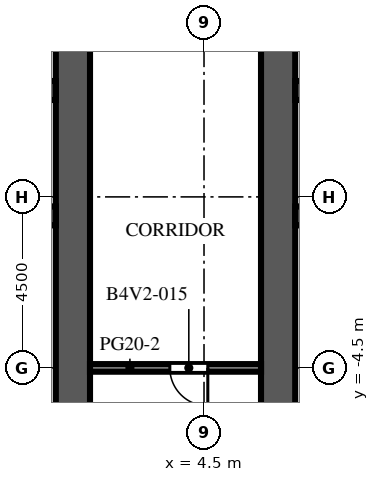
"""IFC4 building model, lengths in metres.
Left out: names, types, materials, properties, quantities, classifications, styles, units other than length and angle.
Written with IfcOpenShell. Run it as: python <this file> out.ifc"""

import sys

from ifc_helpers import new_model, si_unit, direction, frame, frame_2d, origin, place, context, subcontext, project, spatial, rectangle, extrude, element, fill, save


model = new_model("IFC4")
c1 = context("Model", 3, precision=1e-05, world=origin(), true_north=direction((0.0, 1.0)))
c2 = subcontext(c1, "Body", "Model", "MODEL_VIEW")
j1 = project(units=[si_unit("LENGTHUNIT", "METRE"), si_unit("PLANEANGLEUNIT", "RADIAN")], contexts=[c1])
p1 = place(None, origin())
s1 = spatial("IfcSite", under=j1, at=p1, CompositionType="ELEMENT")
p2 = place(p1, origin())
s2 = spatial("IfcBuilding", under=s1, at=p2, CompositionType="ELEMENT")
p3 = place(p2, frame((0.0, 0.0, 141.3)))
s3 = spatial("IfcBuildingStorey", under=s2, at=p3, CompositionType="ELEMENT", Elevation=141.3)
p4 = place(p3, frame((1.05, -9.0, 0.0), z_axis=(0.0, 0.0, 1.0), x_axis=(0.0, 1.0, 0.0)))
e1 = element("IfcWall", 1, at=p4, inside=s3, PredefinedType="SHEAR", context=c2, shape_type="SweptSolid", body=[
    extrude(rectangle(XDim=27.5, YDim=0.9, at=frame_2d((13.75, 0.0))), origin(), (0.0, 0.0, 1.0), 4.1),
])
p5 = place(p4, frame((12.55, 0.0, 0.0)))
e2 = element("IfcOpeningElement", 2, at=p5, cuts=e1, PredefinedType="OPENING", context=c2, shape_type="SweptSolid", body=[
    extrude(rectangle(XDim=2.4, YDim=2.4, at=frame_2d((1.2, 1.2))), frame((0.0, 0.46, 0.0), z_axis=(0.0, -1.0, 0.0), x_axis=(1.0, 0.0, 0.0)), (0.0, 0.0, 1.0), 0.92),
])
p6 = place(p4, frame((5.51, 0.0, 0.0)))
e3 = element("IfcOpeningElement", 3, at=p6, cuts=e1, PredefinedType="OPENING", context=c2, shape_type="SweptSolid", body=[
    extrude(rectangle(XDim=0.923, YDim=2.1, at=frame_2d((0.461, 1.05))), frame((0.0, 0.46, 0.0), z_axis=(0.0, -1.0, 0.0), x_axis=(1.0, 0.0, 0.0)), (0.0, 0.0, 1.0), 0.92),
])
p7 = place(p4, frame((23.427, 0.0, 0.0)))
e4 = element("IfcOpeningElement", 4, at=p7, cuts=e1, PredefinedType="OPENING", context=c2, shape_type="SweptSolid", body=[
    extrude(rectangle(XDim=1.2, YDim=2.1, at=frame_2d((0.6, 1.05))), frame((0.0, 0.46, 0.0), z_axis=(0.0, -1.0, 0.0), x_axis=(1.0, 0.0, 0.0)), (0.0, 0.0, 1.0), 0.92),
])
p8 = place(p3, frame((-9.6, -0.5, 0.0), z_axis=(0.0, 0.0, 1.0), x_axis=(1.0, 0.0, 0.0)))
e5 = element("IfcWall", 5, at=p8, inside=s3, PredefinedType="SHEAR", context=c2, shape_type="SweptSolid", body=[
    extrude(rectangle(XDim=10.2, YDim=0.5, at=frame_2d((5.1, 0.0))), origin(), (0.0, 0.0, 1.0), 4.1),
])
p9 = place(p3, frame((-9.6, 2.8, 0.0), z_axis=(0.0, 0.0, 1.0), x_axis=(1.0, 0.0, 0.0)))
e6 = element("IfcWall", 6, at=p9, inside=s3, PredefinedType="SHEAR", context=c2, shape_type="SweptSolid", body=[
    extrude(rectangle(XDim=10.2, YDim=0.5, at=frame_2d((5.1, 0.0))), origin(), (0.0, 0.0, 1.0), 4.1),
])
p10 = place(p9, frame((0.562, 0.0, 0.0)))
e7 = element("IfcOpeningElement", 7, at=p10, cuts=e6, PredefinedType="OPENING", context=c2, shape_type="SweptSolid", body=[
    extrude(rectangle(XDim=1.1, YDim=2.1, at=frame_2d((0.55, 1.05))), frame((0.0, 0.26, 0.0), z_axis=(0.0, -1.0, 0.0), x_axis=(1.0, 0.0, 0.0)), (0.0, 0.0, 1.0), 0.52),
])
p11 = place(p9, frame((3.238, 0.0, 0.0)))
e8 = element("IfcOpeningElement", 8, at=p11, cuts=e6, PredefinedType="OPENING", context=c2, shape_type="SweptSolid", body=[
    extrude(rectangle(XDim=1.1, YDim=2.1, at=frame_2d((0.55, 1.05))), frame((0.0, 0.26, 0.0), z_axis=(0.0, -1.0, 0.0), x_axis=(1.0, 0.0, 0.0)), (0.0, 0.0, 1.0), 0.52),
])
p12 = place(p9, frame((8.538, 0.0, 0.0)))
e9 = element("IfcOpeningElement", 9, at=p12, cuts=e6, PredefinedType="OPENING", context=c2, shape_type="SweptSolid", body=[
    extrude(rectangle(XDim=1.1, YDim=2.1, at=frame_2d((0.55, 1.05))), frame((0.0, 0.26, 0.0), z_axis=(0.0, -1.0, 0.0), x_axis=(1.0, 0.0, 0.0)), (0.0, 0.0, 1.0), 0.52),
])
p13 = place(p3, frame((6.45, -9.0, 0.0), z_axis=(0.0, 0.0, 1.0), x_axis=(0.0, 1.0, 0.0)))
e10 = element("IfcWall", 10, at=p13, inside=s3, PredefinedType="SHEAR", context=c2, shape_type="SweptSolid", body=[
    extrude(rectangle(XDim=27.5, YDim=0.9, at=frame_2d((13.75, 0.0))), origin(), (0.0, 0.0, 1.0), 4.1),
])
p14 = place(p13, frame((12.55, 0.0, 0.0)))
e11 = element("IfcOpeningElement", 11, at=p14, cuts=e10, PredefinedType="OPENING", context=c2, shape_type="SweptSolid", body=[
    extrude(rectangle(XDim=2.4, YDim=2.4, at=frame_2d((1.2, 1.2))), frame((0.0, 0.46, 0.0), z_axis=(0.0, -1.0, 0.0), x_axis=(1.0, 0.0, 0.0)), (0.0, 0.0, 1.0), 0.92),
])
p15 = place(p13, frame((5.51, 0.0, 0.0)))
e12 = element("IfcOpeningElement", 12, at=p15, cuts=e10, PredefinedType="OPENING", context=c2, shape_type="SweptSolid", body=[
    extrude(rectangle(XDim=0.923, YDim=2.1, at=frame_2d((0.461, 1.05))), frame((0.0, 0.46, 0.0), z_axis=(0.0, -1.0, 0.0), x_axis=(1.0, 0.0, 0.0)), (0.0, 0.0, 1.0), 0.92),
])
p16 = place(p13, frame((23.427, 0.0, 0.0)))
e13 = element("IfcOpeningElement", 13, at=p16, cuts=e10, PredefinedType="OPENING", context=c2, shape_type="SweptSolid", body=[
    extrude(rectangle(XDim=1.2, YDim=2.1, at=frame_2d((0.6, 1.05))), frame((0.0, 0.46, 0.0), z_axis=(0.0, -1.0, 0.0), x_axis=(1.0, 0.0, 0.0)), (0.0, 0.0, 1.0), 0.92),
])
p17 = place(p3, frame((6.9, -0.5, 0.0), z_axis=(0.0, 0.0, 1.0), x_axis=(1.0, 0.0, 0.0)))
e14 = element("IfcWall", 14, at=p17, inside=s3, PredefinedType="SHEAR", context=c2, shape_type="SweptSolid", body=[
    extrude(rectangle(XDim=10.2, YDim=0.5, at=frame_2d((5.1, 0.0))), origin(), (0.0, 0.0, 1.0), 4.1),
])
p18 = place(p3, frame((6.9, 2.8, 0.0), z_axis=(0.0, 0.0, 1.0), x_axis=(1.0, 0.0, 0.0)))
e15 = element("IfcWall", 15, at=p18, inside=s3, PredefinedType="SHEAR", context=c2, shape_type="SweptSolid", body=[
    extrude(rectangle(XDim=10.2, YDim=0.5, at=frame_2d((5.1, 0.0))), origin(), (0.0, 0.0, 1.0), 4.1),
])
p19 = place(p18, frame((0.562, 0.0, 0.0)))
e16 = element("IfcOpeningElement", 16, at=p19, cuts=e15, PredefinedType="OPENING", context=c2, shape_type="SweptSolid", body=[
    extrude(rectangle(XDim=1.1, YDim=2.1, at=frame_2d((0.55, 1.05))), frame((0.0, 0.26, 0.0), z_axis=(0.0, -1.0, 0.0), x_axis=(1.0, 0.0, 0.0)), (0.0, 0.0, 1.0), 0.52),
])
p20 = place(p18, frame((3.238, 0.0, 0.0)))
e17 = element("IfcOpeningElement", 17, at=p20, cuts=e15, PredefinedType="OPENING", context=c2, shape_type="SweptSolid", body=[
    extrude(rectangle(XDim=1.1, YDim=2.1, at=frame_2d((0.55, 1.05))), frame((0.0, 0.26, 0.0), z_axis=(0.0, -1.0, 0.0), x_axis=(1.0, 0.0, 0.0)), (0.0, 0.0, 1.0), 0.52),
])
p21 = place(p18, frame((8.538, 0.0, 0.0)))
e18 = element("IfcOpeningElement", 18, at=p21, cuts=e15, PredefinedType="OPENING", context=c2, shape_type="SweptSolid", body=[
    extrude(rectangle(XDim=1.1, YDim=2.1, at=frame_2d((0.55, 1.05))), frame((0.0, 0.26, 0.0), z_axis=(0.0, -1.0, 0.0), x_axis=(1.0, 0.0, 0.0)), (0.0, 0.0, 1.0), 0.52),
])
p22 = place(p3, frame((-1.825, -3.69, 0.0), z_axis=(0.0, 0.0, 1.0), x_axis=(1.0, 0.0, 0.0)))
e19 = element("IfcWall", 19, at=p22, inside=s3, PredefinedType="PARTITIONING", context=c2, shape_type="SweptSolid", body=[
    extrude(rectangle(XDim=2.425, YDim=0.1, at=frame_2d((1.212, 0.0))), origin(), (0.0, 0.0, 1.0), 3.5),
])
p23 = place(p22, frame((0.712, 0.0, 0.0)))
e20 = element("IfcOpeningElement", 20, at=p23, cuts=e19, PredefinedType="OPENING", context=c2, shape_type="SweptSolid", body=[
    extrude(rectangle(XDim=1.0, YDim=2.1, at=frame_2d((0.5, 1.05))), frame((0.0, 0.06, 0.0), z_axis=(0.0, -1.0, 0.0), x_axis=(1.0, 0.0, 0.0)), (0.0, 0.0, 1.0), 0.12),
])
p24 = place(p3, frame((-1.825, -2.367, 0.0), z_axis=(0.0, 0.0, 1.0), x_axis=(1.0, 0.0, 0.0)))
e21 = element("IfcWall", 21, at=p24, inside=s3, PredefinedType="PARTITIONING", context=c2, shape_type="SweptSolid", body=[
    extrude(rectangle(XDim=2.425, YDim=0.1, at=frame_2d((1.212, 0.0))), origin(), (0.0, 0.0, 1.0), 3.5),
])
p25 = place(p24, frame((0.712, 0.0, 0.0)))
e22 = element("IfcOpeningElement", 22, at=p25, cuts=e21, PredefinedType="OPENING", context=c2, shape_type="SweptSolid", body=[
    extrude(rectangle(XDim=1.0, YDim=2.1, at=frame_2d((0.5, 1.05))), frame((0.0, 0.06, 0.0), z_axis=(0.0, -1.0, 0.0), x_axis=(1.0, 0.0, 0.0)), (0.0, 0.0, 1.0), 0.12),
])
p26 = place(p3, frame((6.9, -3.69, 0.0), z_axis=(0.0, 0.0, 1.0), x_axis=(1.0, 0.0, 0.0)))
e23 = element("IfcWall", 23, at=p26, inside=s3, PredefinedType="PARTITIONING", context=c2, shape_type="SweptSolid", body=[
    extrude(rectangle(XDim=2.425, YDim=0.1, at=frame_2d((1.212, 0.0))), origin(), (0.0, 0.0, 1.0), 3.5),
])
p27 = place(p26, frame((0.712, 0.0, 0.0)))
e24 = element("IfcOpeningElement", 24, at=p27, cuts=e23, PredefinedType="OPENING", context=c2, shape_type="SweptSolid", body=[
    extrude(rectangle(XDim=1.0, YDim=2.1, at=frame_2d((0.5, 1.05))), frame((0.0, 0.06, 0.0), z_axis=(0.0, -1.0, 0.0), x_axis=(1.0, 0.0, 0.0)), (0.0, 0.0, 1.0), 0.12),
])
p28 = place(p3, frame((6.9, -2.367, 0.0), z_axis=(0.0, 0.0, 1.0), x_axis=(1.0, 0.0, 0.0)))
e25 = element("IfcWall", 25, at=p28, inside=s3, PredefinedType="PARTITIONING", context=c2, shape_type="SweptSolid", body=[
    extrude(rectangle(XDim=2.425, YDim=0.1, at=frame_2d((1.212, 0.0))), origin(), (0.0, 0.0, 1.0), 3.5),
])
p29 = place(p28, frame((0.712, 0.0, 0.0)))
e26 = element("IfcOpeningElement", 26, at=p29, cuts=e25, PredefinedType="OPENING", context=c2, shape_type="SweptSolid", body=[
    extrude(rectangle(XDim=1.0, YDim=2.1, at=frame_2d((0.5, 1.05))), frame((0.0, 0.06, 0.0), z_axis=(0.0, -1.0, 0.0), x_axis=(1.0, 0.0, 0.0)), (0.0, 0.0, 1.0), 0.12),
])
p30 = place(p3, frame((6.0, -4.5, 0.0), z_axis=(0.0, 0.0, 1.0), x_axis=(-1.0, 0.0, 0.0)))
e27 = element("IfcWall", 27, at=p30, inside=s3, PredefinedType="PARTITIONING", context=c2, shape_type="SweptSolid", body=[
    extrude(rectangle(XDim=4.5, YDim=0.2, at=frame_2d((2.25, 0.0))), origin(), (0.0, 0.0, 1.0), 3.5),
])
p31 = place(p30, frame((1.4, 0.0, 0.0)))
e28 = element("IfcOpeningElement", 28, at=p31, cuts=e27, PredefinedType="OPENING", context=c2, shape_type="SweptSolid", body=[
    extrude(rectangle(XDim=1.0, YDim=2.1, at=frame_2d((0.5, 1.05))), frame((0.0, 0.11, 0.0), z_axis=(0.0, -1.0, 0.0), x_axis=(1.0, 0.0, 0.0)), (0.0, 0.0, 1.0), 0.22),
])
p32 = place(p5, origin())
e29 = element("IfcDoor", 29, at=p32, inside=s3, OperationType="DOUBLE_DOOR_DOUBLE_SWING", PredefinedType="DOOR", context=c2, shape_type="SweptSolid", body=[
    extrude(rectangle(XDim=2.4, YDim=2.4, at=frame_2d((1.2, 1.2))), frame((0.0, 0.025, 0.0), z_axis=(0.0, -1.0, 0.0), x_axis=(1.0, 0.0, 0.0)), (0.0, 0.0, 1.0), 0.05),
])
fill(e2, e29)
p33 = place(p14, origin())
e30 = element("IfcDoor", 30, at=p33, inside=s3, OperationType="DOUBLE_DOOR_DOUBLE_SWING", PredefinedType="DOOR", context=c2, shape_type="SweptSolid", body=[
    extrude(rectangle(XDim=2.4, YDim=2.4, at=frame_2d((1.2, 1.2))), frame((0.0, 0.025, 0.0), z_axis=(0.0, -1.0, 0.0), x_axis=(1.0, 0.0, 0.0)), (0.0, 0.0, 1.0), 0.05),
])
fill(e11, e30)
p34 = place(p6, origin())
e31 = element("IfcDoor", 31, at=p34, inside=s3, OperationType="SINGLE_SWING_LEFT", PredefinedType="DOOR", context=c2, shape_type="SweptSolid", body=[
    extrude(rectangle(XDim=0.923, YDim=2.1, at=frame_2d((0.461, 1.05))), frame((0.0, 0.425, 0.0), z_axis=(0.0, -1.0, 0.0), x_axis=(1.0, 0.0, 0.0)), (0.0, 0.0, 1.0), 0.05),
])
fill(e3, e31)
p35 = place(p15, origin())
e32 = element("IfcDoor", 32, at=p35, inside=s3, OperationType="SINGLE_SWING_RIGHT", PredefinedType="DOOR", context=c2, shape_type="SweptSolid", body=[
    extrude(rectangle(XDim=0.923, YDim=2.1, at=frame_2d((0.461, 1.05))), frame((0.0, -0.375, 0.0), z_axis=(0.0, -1.0, 0.0), x_axis=(1.0, 0.0, 0.0)), (0.0, 0.0, 1.0), 0.05),
])
fill(e12, e32)
p36 = place(p31, origin())
e33 = element("IfcDoor", 33, at=p36, inside=s3, OperationType="SINGLE_SWING_LEFT", PredefinedType="DOOR", context=c2, shape_type="SweptSolid", body=[
    extrude(rectangle(XDim=1.0, YDim=2.1, at=frame_2d((0.5, 1.05))), frame((0.0, 0.025, 0.0), z_axis=(0.0, -1.0, 0.0), x_axis=(1.0, 0.0, 0.0)), (0.0, 0.0, 1.0), 0.05),
])
fill(e28, e33)
save(model, sys.argv[1])
